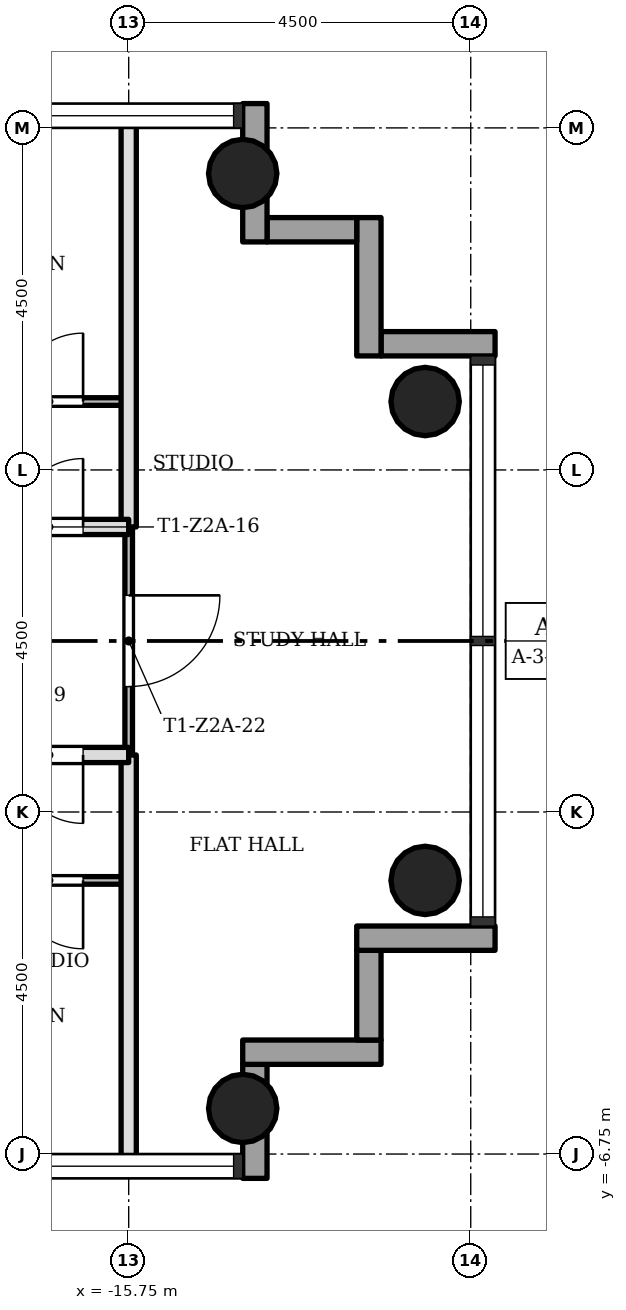
"""IFC4 building model, lengths in metres.
Left out: names, types, materials, properties, quantities, classifications, styles, units other than length and angle.
Written with IfcOpenShell. Run it as: python <this file> out.ifc"""

import sys

from ifc_helpers import new_model, si_unit, direction, frame, frame_2d, origin, origin_2d, place, context, subcontext, project, spatial, rectangle, hollow_circle, extrude, element, fill, save


model = new_model("IFC4")
c1 = context("Model", 3, precision=1e-05, world=origin(), true_north=direction((0.0, 1.0)))
c2 = subcontext(c1, "Body", "Model", "MODEL_VIEW")
j1 = project(units=[si_unit("LENGTHUNIT", "METRE"), si_unit("PLANEANGLEUNIT", "RADIAN")], contexts=[c1])
p1 = place(None, origin())
s1 = spatial("IfcSite", under=j1, at=p1, CompositionType="ELEMENT")
p2 = place(p1, origin())
s2 = spatial("IfcBuilding", under=s1, at=p2, CompositionType="ELEMENT")
p3 = place(p2, frame((0.0, 0.0, 117.4)))
s3 = spatial("IfcBuildingStorey", under=s2, at=p3, CompositionType="ELEMENT", Elevation=117.4)
for number, where, z_axis, x_axis in (
    (1, (-14.25, -6.15, 0.0), (0.0, 0.0, 1.0), (1.0, 0.0, 0.0)),
    (2, (-14.25, 6.15, 0.0), (0.0, 0.0, 1.0), (1.0, 0.0, 0.0)),
    (3, (-11.85, -3.15, 0.0), (0.0, 0.0, 1.0), (1.0, 0.0, 0.0)),
    (4, (-11.85, 3.15, 0.0), (0.0, 0.0, 1.0), (1.0, 0.0, 0.0)),
):
    element("IfcColumn", number, at=place(p3, frame(where, z_axis=z_axis, x_axis=x_axis)), inside=s3, PredefinedType="COLUMN", context=c2, shape_type="SweptSolid", body=[
        extrude(hollow_circle(Radius=0.45, WallThickness=0.032, at=origin_2d()), origin(), (0.0, 0.0, 1.0), 3.4),
    ])
p4 = place(p3, frame((-14.09, -7.07, -0.3), z_axis=(0.0, 0.0, 1.0), x_axis=(0.0, 1.0, 0.0)))
e5 = element("IfcWall", 5, at=p4, inside=s3, PredefinedType="STANDARD", context=c2, shape_type="SweptSolid", body=[
    extrude(rectangle(XDim=1.5, YDim=0.32, at=frame_2d((0.75, 0.0))), origin(), (0.0, 0.0, 1.0), 3.4),
])
p5 = place(p3, frame((-14.25, -5.41, -0.3), z_axis=(0.0, 0.0, 1.0), x_axis=(1.0, 0.0, 0.0)))
e6 = element("IfcWall", 6, at=p5, inside=s3, PredefinedType="STANDARD", context=c2, shape_type="SweptSolid", body=[
    extrude(rectangle(XDim=1.82, YDim=0.32, at=frame_2d((0.91, 0.0))), origin(), (0.0, 0.0, 1.0), 3.4),
])
p6 = place(p3, frame((-12.59, -5.25, -0.3), z_axis=(0.0, 0.0, 1.0), x_axis=(0.0, 1.0, 0.0)))
e7 = element("IfcWall", 7, at=p6, inside=s3, PredefinedType="STANDARD", context=c2, shape_type="SweptSolid", body=[
    extrude(rectangle(XDim=1.18, YDim=0.32, at=frame_2d((0.59, 0.0))), origin(), (0.0, 0.0, 1.0), 3.4),
])
p7 = place(p3, frame((-12.75, -3.91, -0.3), z_axis=(0.0, 0.0, 1.0), x_axis=(1.0, 0.0, 0.0)))
e8 = element("IfcWall", 8, at=p7, inside=s3, PredefinedType="STANDARD", context=c2, shape_type="SweptSolid", body=[
    extrude(rectangle(XDim=1.82, YDim=0.32, at=frame_2d((0.91, 0.0))), origin(), (0.0, 0.0, 1.0), 3.4),
])
p8 = place(p3, frame((-10.93, 3.91, -0.3), z_axis=(0.0, 0.0, 1.0), x_axis=(-1.0, 0.0, 0.0)))
e9 = element("IfcWall", 9, at=p8, inside=s3, PredefinedType="STANDARD", context=c2, shape_type="SweptSolid", body=[
    extrude(rectangle(XDim=1.5, YDim=0.32, at=frame_2d((0.75, 0.0))), origin(), (0.0, 0.0, 1.0), 3.4),
])
p9 = place(p3, frame((-12.59, 3.75, -0.3), z_axis=(0.0, 0.0, 1.0), x_axis=(0.0, 1.0, 0.0)))
e10 = element("IfcWall", 10, at=p9, inside=s3, PredefinedType="STANDARD", context=c2, shape_type="SweptSolid", body=[
    extrude(rectangle(XDim=1.82, YDim=0.32, at=frame_2d((0.91, 0.0))), origin(), (0.0, 0.0, 1.0), 3.4),
])
p10 = place(p3, frame((-12.75, 5.41, -0.3), z_axis=(0.0, 0.0, 1.0), x_axis=(-1.0, 0.0, 0.0)))
e11 = element("IfcWall", 11, at=p10, inside=s3, PredefinedType="STANDARD", context=c2, shape_type="SweptSolid", body=[
    extrude(rectangle(XDim=1.18, YDim=0.32, at=frame_2d((0.59, 0.0))), origin(), (0.0, 0.0, 1.0), 3.4),
])
p11 = place(p3, frame((-14.09, 5.25, -0.3), z_axis=(0.0, 0.0, 1.0), x_axis=(0.0, 1.0, 0.0)))
e12 = element("IfcWall", 12, at=p11, inside=s3, PredefinedType="STANDARD", context=c2, shape_type="SweptSolid", body=[
    extrude(rectangle(XDim=1.82, YDim=0.32, at=frame_2d((0.91, 0.0))), origin(), (0.0, 0.0, 1.0), 3.4),
])
p12 = place(p3, frame((-15.75, -1.5, 0.0), z_axis=(0.0, 0.0, 1.0), x_axis=(0.0, 1.0, 0.0)))
e13 = element("IfcWall", 13, at=p12, inside=s3, PredefinedType="PARTITIONING", context=c2, shape_type="SweptSolid", body=[
    extrude(rectangle(XDim=3.0, YDim=0.1, at=frame_2d((1.5, 0.0))), origin(), (0.0, 0.0, 1.0), 3.0),
])
p13 = place(p12, frame((0.9, 0.0, 0.0)))
e14 = element("IfcOpeningElement", 14, at=p13, cuts=e13, PredefinedType="OPENING", context=c2, shape_type="SweptSolid", body=[
    extrude(rectangle(XDim=1.2, YDim=2.1, at=frame_2d((0.6, 1.05))), frame((0.0, 0.06, 0.0), z_axis=(0.0, -1.0, 0.0), x_axis=(1.0, 0.0, 0.0)), (0.0, 0.0, 1.0), 0.12),
])
for number, where, z_axis, x_axis in (
    (15, (-15.75, -6.85, 0.0), (0.0, 0.0, 1.0), (0.0, 1.0, 0.0)),
    (16, (-15.75, 1.5, 0.0), (0.0, 0.0, 1.0), (0.0, 1.0, 0.0)),
):
    element("IfcWall", number, at=place(p3, frame(where, z_axis=z_axis, x_axis=x_axis)), inside=s3, PredefinedType="SOLIDWALL", context=c2, shape_type="SweptSolid", body=[
        extrude(rectangle(XDim=5.35, YDim=0.2, at=frame_2d((2.675, 0.0))), origin(), (0.0, 0.0, 1.0), 3.0),
    ])
p14 = place(p3, frame((-20.25, -3.15, 0.0), z_axis=(0.0, 0.0, 1.0), x_axis=(1.0, 0.0, 0.0)))
e17 = element("IfcWall", 17, at=p14, inside=s3, PredefinedType="PARTITIONING", context=c2, shape_type="SweptSolid", body=[
    extrude(rectangle(XDim=4.5, YDim=0.1, at=frame_2d((2.25, 0.0))), origin(), (0.0, 0.0, 1.0), 3.0),
])
p15 = place(p14, frame((3.0, 0.0, 0.0)))
e18 = element("IfcOpeningElement", 18, at=p15, cuts=e17, PredefinedType="OPENING", context=c2, shape_type="SweptSolid", body=[
    extrude(rectangle(XDim=0.9, YDim=2.1, at=frame_2d((0.45, 1.05))), frame((0.0, 0.06, 0.0), z_axis=(0.0, -1.0, 0.0), x_axis=(1.0, 0.0, 0.0)), (0.0, 0.0, 1.0), 0.12),
])
p16 = place(p3, frame((-20.25, -1.5, 0.0), z_axis=(0.0, 0.0, 1.0), x_axis=(1.0, 0.0, 0.0)))
e19 = element("IfcWall", 19, at=p16, inside=s3, PredefinedType="SOLIDWALL", context=c2, shape_type="SweptSolid", body=[
    extrude(rectangle(XDim=4.5, YDim=0.2, at=frame_2d((2.25, 0.0))), origin(), (0.0, 0.0, 1.0), 3.0),
])
p17 = place(p16, frame((3.0, 0.0, 0.0)))
e20 = element("IfcOpeningElement", 20, at=p17, cuts=e19, PredefinedType="OPENING", context=c2, shape_type="SweptSolid", body=[
    extrude(rectangle(XDim=0.9, YDim=2.1, at=frame_2d((0.45, 1.05))), frame((0.0, 0.11, 0.0), z_axis=(0.0, -1.0, 0.0), x_axis=(1.0, 0.0, 0.0)), (0.0, 0.0, 1.0), 0.22),
])
p18 = place(p3, frame((-20.25, 1.5, 0.0), z_axis=(0.0, 0.0, 1.0), x_axis=(1.0, 0.0, 0.0)))
e21 = element("IfcWall", 21, at=p18, inside=s3, PredefinedType="SOLIDWALL", context=c2, shape_type="SweptSolid", body=[
    extrude(rectangle(XDim=4.5, YDim=0.2, at=frame_2d((2.25, 0.0))), origin(), (0.0, 0.0, 1.0), 3.0),
])
p19 = place(p18, frame((3.0, 0.0, 0.0)))
e22 = element("IfcOpeningElement", 22, at=p19, cuts=e21, PredefinedType="OPENING", context=c2, shape_type="SweptSolid", body=[
    extrude(rectangle(XDim=0.9, YDim=2.1, at=frame_2d((0.45, 1.05))), frame((0.0, 0.11, 0.0), z_axis=(0.0, -1.0, 0.0), x_axis=(1.0, 0.0, 0.0)), (0.0, 0.0, 1.0), 0.22),
])
p20 = place(p3, frame((-20.25, 3.15, 0.0), z_axis=(0.0, 0.0, 1.0), x_axis=(1.0, 0.0, 0.0)))
e23 = element("IfcWall", 23, at=p20, inside=s3, PredefinedType="PARTITIONING", context=c2, shape_type="SweptSolid", body=[
    extrude(rectangle(XDim=4.5, YDim=0.1, at=frame_2d((2.25, 0.0))), origin(), (0.0, 0.0, 1.0), 3.0),
])
p21 = place(p20, frame((3.0, 0.0, 0.0)))
e24 = element("IfcOpeningElement", 24, at=p21, cuts=e23, PredefinedType="OPENING", context=c2, shape_type="SweptSolid", body=[
    extrude(rectangle(XDim=0.9, YDim=2.1, at=frame_2d((0.45, 1.05))), frame((0.0, 0.06, 0.0), z_axis=(0.0, -1.0, 0.0), x_axis=(1.0, 0.0, 0.0)), (0.0, 0.0, 1.0), 0.12),
])
p22 = place(p19, origin())
e25 = element("IfcDoor", 25, at=p22, inside=s3, OperationType="SINGLE_SWING_LEFT", PredefinedType="DOOR", context=c2, shape_type="SweptSolid", body=[
    extrude(rectangle(XDim=0.9, YDim=2.1, at=frame_2d((0.45, 1.05))), frame((0.0, 0.025, 0.0), z_axis=(0.0, -1.0, 0.0), x_axis=(1.0, 0.0, 0.0)), (0.0, 0.0, 1.0), 0.05),
])
fill(e22, e25)
p23 = place(p21, origin())
e26 = element("IfcDoor", 26, at=p23, inside=s3, OperationType="SINGLE_SWING_LEFT", PredefinedType="DOOR", context=c2, shape_type="SweptSolid", body=[
    extrude(rectangle(XDim=0.9, YDim=2.1, at=frame_2d((0.45, 1.05))), frame((0.0, 0.025, 0.0), z_axis=(0.0, -1.0, 0.0), x_axis=(1.0, 0.0, 0.0)), (0.0, 0.0, 1.0), 0.05),
])
fill(e24, e26)
p24 = place(p17, origin())
e27 = element("IfcDoor", 27, at=p24, inside=s3, OperationType="SINGLE_SWING_RIGHT", PredefinedType="DOOR", context=c2, shape_type="SweptSolid", body=[
    extrude(rectangle(XDim=0.9, YDim=2.1, at=frame_2d((0.45, 1.05))), frame((0.0, 0.025, 0.0), z_axis=(0.0, -1.0, 0.0), x_axis=(1.0, 0.0, 0.0)), (0.0, 0.0, 1.0), 0.05),
])
fill(e20, e27)
p25 = place(p15, origin())
e28 = element("IfcDoor", 28, at=p25, inside=s3, OperationType="SINGLE_SWING_RIGHT", PredefinedType="DOOR", context=c2, shape_type="SweptSolid", body=[
    extrude(rectangle(XDim=0.9, YDim=2.1, at=frame_2d((0.45, 1.05))), frame((0.0, 0.025, 0.0), z_axis=(0.0, -1.0, 0.0), x_axis=(1.0, 0.0, 0.0)), (0.0, 0.0, 1.0), 0.05),
])
fill(e18, e28)
p26 = place(p13, origin())
e29 = element("IfcDoor", 29, at=p26, inside=s3, OperationType="SINGLE_SWING_RIGHT", PredefinedType="DOOR", context=c2, shape_type="SweptSolid", body=[
    extrude(rectangle(XDim=1.2, YDim=2.1, at=frame_2d((0.6, 1.05))), frame((0.0, 0.025, 0.0), z_axis=(0.0, -1.0, 0.0), x_axis=(1.0, 0.0, 0.0)), (0.0, 0.0, 1.0), 0.05),
])
fill(e14, e29)
save(model, sys.argv[1])
